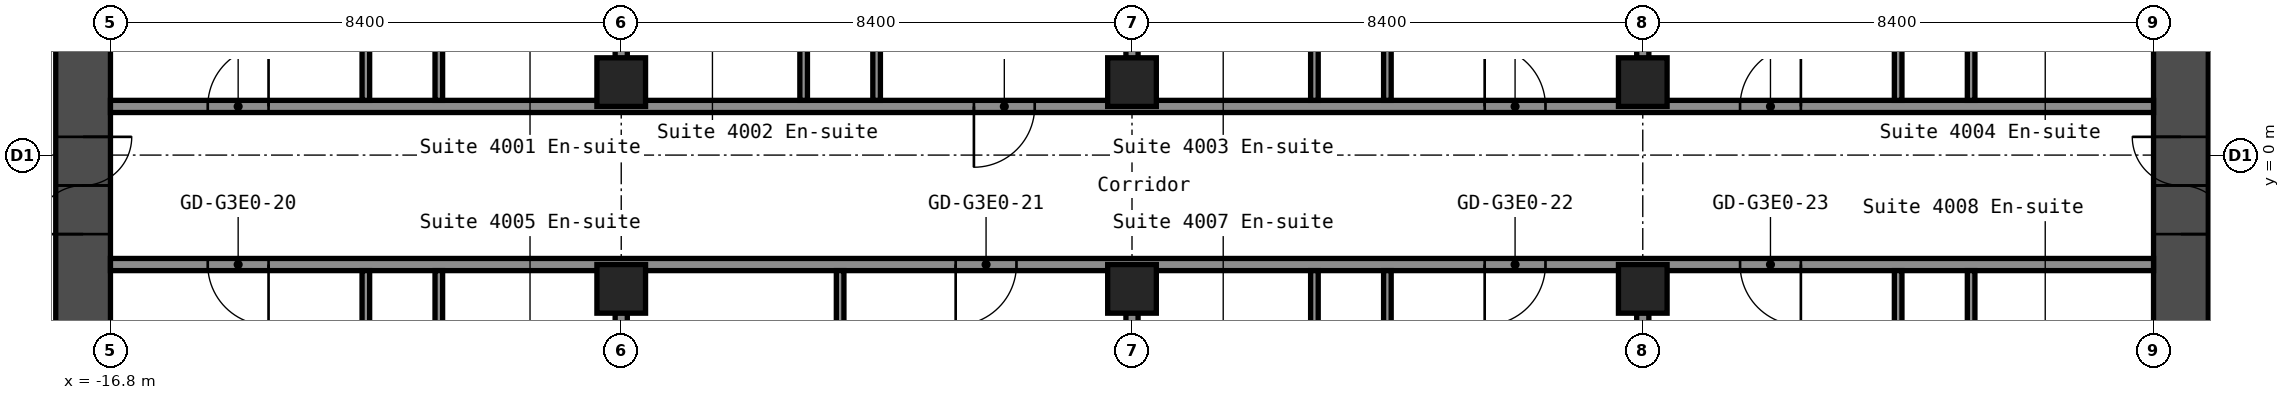
"""IFC4 building model, lengths in metres.
Left out: names, types, materials, properties, quantities, classifications, styles, units other than length and angle.
Written with IfcOpenShell. Run it as: python <this file> out.ifc"""

import sys

from ifc_helpers import new_model, si_unit, direction, frame, frame_2d, origin, origin_2d, place, context, subcontext, project, spatial, rectangle, hollow_rectangle, extrude, element, fill, save


model = new_model("IFC4")
c1 = context("Model", 3, precision=1e-05, world=origin(), true_north=direction((0.0, 1.0)))
c2 = subcontext(c1, "Body", "Model", "MODEL_VIEW")
j1 = project(units=[si_unit("LENGTHUNIT", "METRE"), si_unit("PLANEANGLEUNIT", "RADIAN")], contexts=[c1])
p1 = place(None, origin())
s1 = spatial("IfcSite", under=j1, at=p1, CompositionType="ELEMENT")
p2 = place(p1, origin())
s2 = spatial("IfcBuilding", under=s1, at=p2, CompositionType="ELEMENT")
p3 = place(p2, frame((0.0, 0.0, 143.8)))
s3 = spatial("IfcBuildingStorey", under=s2, at=p3, CompositionType="ELEMENT", Elevation=143.8)
for number, where, z_axis, x_axis in (
    (1, (-8.4, -2.2, 0.0), (0.0, 0.0, 1.0), (1.0, 0.0, 0.0)),
    (2, (-8.4, 1.2, 0.0), (0.0, 0.0, 1.0), (1.0, 0.0, 0.0)),
    (3, (0.0, -2.2, 0.0), (0.0, 0.0, 1.0), (1.0, 0.0, 0.0)),
    (4, (0.0, 1.2, 0.0), (0.0, 0.0, 1.0), (1.0, 0.0, 0.0)),
    (5, (8.4, -2.2, 0.0), (0.0, 0.0, 1.0), (1.0, 0.0, 0.0)),
    (6, (8.4, 1.2, 0.0), (0.0, 0.0, 1.0), (1.0, 0.0, 0.0)),
):
    element("IfcColumn", number, at=place(p3, frame(where, z_axis=z_axis, x_axis=x_axis)), inside=s3, PredefinedType="COLUMN", context=c2, shape_type="SweptSolid", body=[
        extrude(hollow_rectangle(XDim=0.8, YDim=0.8, WallThickness=0.032, at=origin_2d()), origin(), (0.0, 0.0, 1.0), 2.75),
    ])
p4 = place(p3, frame((-17.25, -8.4, 0.0), z_axis=(0.0, 0.0, 1.0), x_axis=(0.0, 1.0, 0.0)))
e7 = element("IfcWall", 7, at=p4, inside=s3, PredefinedType="SHEAR", context=c2, shape_type="SweptSolid", body=[
    extrude(rectangle(XDim=16.8, YDim=0.9, at=frame_2d((8.4, 0.0))), origin(), (0.0, 0.0, 1.0), 2.75),
])
p5 = place(p4, frame((7.1, 0.0, 0.0)))
e8 = element("IfcOpeningElement", 8, at=p5, cuts=e7, PredefinedType="OPENING", context=c2, shape_type="SweptSolid", body=[
    extrude(rectangle(XDim=1.6, YDim=2.1, at=frame_2d((0.8, 1.05))), frame((0.0, 0.46, 0.0), z_axis=(0.0, -1.0, 0.0), x_axis=(1.0, 0.0, 0.0)), (0.0, 0.0, 1.0), 0.92),
])
p6 = place(p3, frame((17.25, -8.4, 0.0), z_axis=(0.0, 0.0, 1.0), x_axis=(0.0, 1.0, 0.0)))
e9 = element("IfcWall", 9, at=p6, inside=s3, PredefinedType="SHEAR", context=c2, shape_type="SweptSolid", body=[
    extrude(rectangle(XDim=16.8, YDim=0.9, at=frame_2d((8.4, 0.0))), origin(), (0.0, 0.0, 1.0), 2.75),
])
p7 = place(p6, frame((7.1, 0.0, 0.0)))
e10 = element("IfcOpeningElement", 10, at=p7, cuts=e9, PredefinedType="OPENING", context=c2, shape_type="SweptSolid", body=[
    extrude(rectangle(XDim=1.6, YDim=2.1, at=frame_2d((0.8, 1.05))), frame((0.0, 0.46, 0.0), z_axis=(0.0, -1.0, 0.0), x_axis=(1.0, 0.0, 0.0)), (0.0, 0.0, 1.0), 0.92),
])
p8 = place(p3, frame((-16.8, -1.8, 0.0), z_axis=(0.0, 0.0, 1.0), x_axis=(1.0, 0.0, 0.0)))
e11 = element("IfcWall", 11, at=p8, inside=s3, PredefinedType="PARTITIONING", context=c2, shape_type="SweptSolid", body=[
    extrude(rectangle(XDim=33.6, YDim=0.2, at=frame_2d((16.8, 0.0))), origin(), (0.0, 0.0, 1.0), 2.75),
])
p9 = place(p8, frame((1.6, 0.0, 0.0)))
e12 = element("IfcOpeningElement", 12, at=p9, cuts=e11, PredefinedType="OPENING", context=c2, shape_type="SweptSolid", body=[
    extrude(rectangle(XDim=1.0, YDim=2.1, at=frame_2d((0.5, 1.05))), frame((0.0, 0.11, 0.0), z_axis=(0.0, -1.0, 0.0), x_axis=(1.0, 0.0, 0.0)), (0.0, 0.0, 1.0), 0.22),
])
p10 = place(p8, frame((13.9, 0.0, 0.0)))
e13 = element("IfcOpeningElement", 13, at=p10, cuts=e11, PredefinedType="OPENING", context=c2, shape_type="SweptSolid", body=[
    extrude(rectangle(XDim=1.0, YDim=2.1, at=frame_2d((0.5, 1.05))), frame((0.0, 0.11, 0.0), z_axis=(0.0, -1.0, 0.0), x_axis=(1.0, 0.0, 0.0)), (0.0, 0.0, 1.0), 0.22),
])
p11 = place(p8, frame((22.6, 0.0, 0.0)))
e14 = element("IfcOpeningElement", 14, at=p11, cuts=e11, PredefinedType="OPENING", context=c2, shape_type="SweptSolid", body=[
    extrude(rectangle(XDim=1.0, YDim=2.1, at=frame_2d((0.5, 1.05))), frame((0.0, 0.11, 0.0), z_axis=(0.0, -1.0, 0.0), x_axis=(1.0, 0.0, 0.0)), (0.0, 0.0, 1.0), 0.22),
])
p12 = place(p8, frame((26.8, 0.0, 0.0)))
e15 = element("IfcOpeningElement", 15, at=p12, cuts=e11, PredefinedType="OPENING", context=c2, shape_type="SweptSolid", body=[
    extrude(rectangle(XDim=1.0, YDim=2.1, at=frame_2d((0.5, 1.05))), frame((0.0, 0.11, 0.0), z_axis=(0.0, -1.0, 0.0), x_axis=(1.0, 0.0, 0.0)), (0.0, 0.0, 1.0), 0.22),
])
p13 = place(p3, frame((-16.8, 0.8, 0.0), z_axis=(0.0, 0.0, 1.0), x_axis=(1.0, 0.0, 0.0)))
e16 = element("IfcWall", 16, at=p13, inside=s3, PredefinedType="PARTITIONING", context=c2, shape_type="SweptSolid", body=[
    extrude(rectangle(XDim=33.6, YDim=0.2, at=frame_2d((16.8, 0.0))), origin(), (0.0, 0.0, 1.0), 2.75),
])
p14 = place(p13, frame((1.6, 0.0, 0.0)))
e17 = element("IfcOpeningElement", 17, at=p14, cuts=e16, PredefinedType="OPENING", context=c2, shape_type="SweptSolid", body=[
    extrude(rectangle(XDim=1.0, YDim=2.1, at=frame_2d((0.5, 1.05))), frame((0.0, 0.11, 0.0), z_axis=(0.0, -1.0, 0.0), x_axis=(1.0, 0.0, 0.0)), (0.0, 0.0, 1.0), 0.22),
])
p15 = place(p13, frame((14.2, 0.0, 0.0)))
e18 = element("IfcOpeningElement", 18, at=p15, cuts=e16, PredefinedType="OPENING", context=c2, shape_type="SweptSolid", body=[
    extrude(rectangle(XDim=1.0, YDim=2.1, at=frame_2d((0.5, 1.05))), frame((0.0, 0.11, 0.0), z_axis=(0.0, -1.0, 0.0), x_axis=(1.0, 0.0, 0.0)), (0.0, 0.0, 1.0), 0.22),
])
p16 = place(p13, frame((22.6, 0.0, 0.0)))
e19 = element("IfcOpeningElement", 19, at=p16, cuts=e16, PredefinedType="OPENING", context=c2, shape_type="SweptSolid", body=[
    extrude(rectangle(XDim=1.0, YDim=2.1, at=frame_2d((0.5, 1.05))), frame((0.0, 0.11, 0.0), z_axis=(0.0, -1.0, 0.0), x_axis=(1.0, 0.0, 0.0)), (0.0, 0.0, 1.0), 0.22),
])
p17 = place(p13, frame((26.8, 0.0, 0.0)))
e20 = element("IfcOpeningElement", 20, at=p17, cuts=e16, PredefinedType="OPENING", context=c2, shape_type="SweptSolid", body=[
    extrude(rectangle(XDim=1.0, YDim=2.1, at=frame_2d((0.5, 1.05))), frame((0.0, 0.11, 0.0), z_axis=(0.0, -1.0, 0.0), x_axis=(1.0, 0.0, 0.0)), (0.0, 0.0, 1.0), 0.22),
])
p18 = place(p3, frame((-12.6, -19.3, 0.0), z_axis=(0.0, 0.0, 1.0), x_axis=(0.0, 1.0, 0.0)))
e21 = element("IfcWall", 21, at=p18, inside=s3, PredefinedType="PARTITIONING", context=c2, shape_type="SweptSolid", body=[
    extrude(rectangle(XDim=17.4, YDim=0.125, at=frame_2d((8.7, 0.0))), origin(), (0.0, 0.0, 1.0), 2.75),
])
p19 = place(p18, frame((12.45, 0.0, 0.0)))
e22 = element("IfcOpeningElement", 22, at=p19, cuts=e21, PredefinedType="OPENING", context=c2, shape_type="SweptSolid", body=[
    extrude(rectangle(XDim=0.9, YDim=2.1, at=frame_2d((0.45, 1.05))), frame((0.0, 0.073, 0.0), z_axis=(0.0, -1.0, 0.0), x_axis=(1.0, 0.0, 0.0)), (0.0, 0.0, 1.0), 0.145),
])
p20 = place(p3, frame((-12.6, 0.9, 0.0), z_axis=(0.0, 0.0, 1.0), x_axis=(0.0, 1.0, 0.0)))
e23 = element("IfcWall", 23, at=p20, inside=s3, PredefinedType="PARTITIONING", context=c2, shape_type="SweptSolid", body=[
    extrude(rectangle(XDim=17.4, YDim=0.125, at=frame_2d((8.7, 0.0))), origin(), (0.0, 0.0, 1.0), 2.75),
])
p21 = place(p20, frame((4.05, 0.0, 0.0)))
e24 = element("IfcOpeningElement", 24, at=p21, cuts=e23, PredefinedType="OPENING", context=c2, shape_type="SweptSolid", body=[
    extrude(rectangle(XDim=0.9, YDim=2.1, at=frame_2d((0.45, 1.05))), frame((0.0, 0.073, 0.0), z_axis=(0.0, -1.0, 0.0), x_axis=(1.0, 0.0, 0.0)), (0.0, 0.0, 1.0), 0.145),
])
for number, where, z_axis, x_axis in (
    (25, (-11.4, -5.0, 0.0), (0.0, 0.0, 1.0), (0.0, 1.0, 0.0)),
    (26, (-11.4, 0.9, 0.0), (0.0, 0.0, 1.0), (0.0, 1.0, 0.0)),
):
    element("IfcWall", number, at=place(p3, frame(where, z_axis=z_axis, x_axis=x_axis)), inside=s3, PredefinedType="PARTITIONING", context=c2, shape_type="SweptSolid", body=[
        extrude(rectangle(XDim=3.1, YDim=0.125, at=frame_2d((1.55, 0.0))), origin(), (0.0, 0.0, 1.0), 2.75),
    ])
for number, where, z_axis, x_axis in (
    (27, (-8.4, -19.3, 0.0), (0.0, 0.0, 1.0), (0.0, 1.0, 0.0)),
    (28, (-8.4, 1.59, 0.0), (0.0, 0.0, 1.0), (0.0, 1.0, 0.0)),
):
    element("IfcWall", number, at=place(p3, frame(where, z_axis=z_axis, x_axis=x_axis)), inside=s3, PredefinedType="PARTITIONING", context=c2, shape_type="SweptSolid", body=[
        extrude(rectangle(XDim=16.71, YDim=0.2, at=frame_2d((8.355, 0.0))), origin(), (0.0, 0.0, 1.0), 2.75),
    ])
p22 = place(p3, frame((-5.4, 0.9, 0.0), z_axis=(0.0, 0.0, 1.0), x_axis=(0.0, 1.0, 0.0)))
e29 = element("IfcWall", 29, at=p22, inside=s3, PredefinedType="PARTITIONING", context=c2, shape_type="SweptSolid", body=[
    extrude(rectangle(XDim=3.1, YDim=0.125, at=frame_2d((1.55, 0.0))), origin(), (0.0, 0.0, 1.0), 2.75),
])
p23 = place(p3, frame((-4.8, -5.2, 0.0), z_axis=(0.0, 0.0, 1.0), x_axis=(0.0, 1.0, 0.0)))
e30 = element("IfcWall", 30, at=p23, inside=s3, PredefinedType="PARTITIONING", context=c2, shape_type="SweptSolid", body=[
    extrude(rectangle(XDim=3.3, YDim=0.125, at=frame_2d((1.65, 0.0))), origin(), (0.0, 0.0, 1.0), 2.75),
])
p24 = place(p23, frame((1.2, 0.0, 0.0)))
e31 = element("IfcOpeningElement", 31, at=p24, cuts=e30, PredefinedType="OPENING", context=c2, shape_type="SweptSolid", body=[
    extrude(rectangle(XDim=1.0, YDim=2.1, at=frame_2d((0.5, 1.05))), frame((0.0, 0.073, 0.0), z_axis=(0.0, -1.0, 0.0), x_axis=(1.0, 0.0, 0.0)), (0.0, 0.0, 1.0), 0.145),
])
p25 = place(p3, frame((-4.2, 0.9, 0.0), z_axis=(0.0, 0.0, 1.0), x_axis=(0.0, 1.0, 0.0)))
e32 = element("IfcWall", 32, at=p25, inside=s3, PredefinedType="PARTITIONING", context=c2, shape_type="SweptSolid", body=[
    extrude(rectangle(XDim=17.4, YDim=0.125, at=frame_2d((8.7, 0.0))), origin(), (0.0, 0.0, 1.0), 2.75),
])
p26 = place(p25, frame((4.05, 0.0, 0.0)))
e33 = element("IfcOpeningElement", 33, at=p26, cuts=e32, PredefinedType="OPENING", context=c2, shape_type="SweptSolid", body=[
    extrude(rectangle(XDim=0.9, YDim=2.1, at=frame_2d((0.45, 1.05))), frame((0.0, 0.073, 0.0), z_axis=(0.0, -1.0, 0.0), x_axis=(1.0, 0.0, 0.0)), (0.0, 0.0, 1.0), 0.145),
])
for number, where, z_axis, x_axis in (
    (34, (0.0, -19.3, 0.0), (0.0, 0.0, 1.0), (0.0, 1.0, 0.0)),
    (35, (0.0, 1.59, 0.0), (0.0, 0.0, 1.0), (0.0, 1.0, 0.0)),
):
    element("IfcWall", number, at=place(p3, frame(where, z_axis=z_axis, x_axis=x_axis)), inside=s3, PredefinedType="PARTITIONING", context=c2, shape_type="SweptSolid", body=[
        extrude(rectangle(XDim=16.71, YDim=0.2, at=frame_2d((8.355, 0.0))), origin(), (0.0, 0.0, 1.0), 2.75),
    ])
for number, where, z_axis, x_axis in (
    (36, (3.0, -5.0, 0.0), (0.0, 0.0, 1.0), (0.0, 1.0, 0.0)),
    (37, (3.0, 0.9, 0.0), (0.0, 0.0, 1.0), (0.0, 1.0, 0.0)),
):
    element("IfcWall", number, at=place(p3, frame(where, z_axis=z_axis, x_axis=x_axis)), inside=s3, PredefinedType="PARTITIONING", context=c2, shape_type="SweptSolid", body=[
        extrude(rectangle(XDim=3.1, YDim=0.125, at=frame_2d((1.55, 0.0))), origin(), (0.0, 0.0, 1.0), 2.75),
    ])
p27 = place(p3, frame((4.2, -19.3, 0.0), z_axis=(0.0, 0.0, 1.0), x_axis=(0.0, 1.0, 0.0)))
e38 = element("IfcWall", 38, at=p27, inside=s3, PredefinedType="PARTITIONING", context=c2, shape_type="SweptSolid", body=[
    extrude(rectangle(XDim=17.4, YDim=0.125, at=frame_2d((8.7, 0.0))), origin(), (0.0, 0.0, 1.0), 2.75),
])
p28 = place(p27, frame((12.45, 0.0, 0.0)))
e39 = element("IfcOpeningElement", 39, at=p28, cuts=e38, PredefinedType="OPENING", context=c2, shape_type="SweptSolid", body=[
    extrude(rectangle(XDim=0.9, YDim=2.1, at=frame_2d((0.45, 1.05))), frame((0.0, 0.073, 0.0), z_axis=(0.0, -1.0, 0.0), x_axis=(1.0, 0.0, 0.0)), (0.0, 0.0, 1.0), 0.145),
])
p29 = place(p3, frame((4.2, 0.9, 0.0), z_axis=(0.0, 0.0, 1.0), x_axis=(0.0, 1.0, 0.0)))
e40 = element("IfcWall", 40, at=p29, inside=s3, PredefinedType="PARTITIONING", context=c2, shape_type="SweptSolid", body=[
    extrude(rectangle(XDim=17.4, YDim=0.125, at=frame_2d((8.7, 0.0))), origin(), (0.0, 0.0, 1.0), 2.75),
])
p30 = place(p29, frame((4.05, 0.0, 0.0)))
e41 = element("IfcOpeningElement", 41, at=p30, cuts=e40, PredefinedType="OPENING", context=c2, shape_type="SweptSolid", body=[
    extrude(rectangle(XDim=0.9, YDim=2.1, at=frame_2d((0.45, 1.05))), frame((0.0, 0.073, 0.0), z_axis=(0.0, -1.0, 0.0), x_axis=(1.0, 0.0, 0.0)), (0.0, 0.0, 1.0), 0.145),
])
for number, where, z_axis, x_axis in (
    (42, (8.4, -19.3, 0.0), (0.0, 0.0, 1.0), (0.0, 1.0, 0.0)),
    (43, (8.4, 1.59, 0.0), (0.0, 0.0, 1.0), (0.0, 1.0, 0.0)),
):
    element("IfcWall", number, at=place(p3, frame(where, z_axis=z_axis, x_axis=x_axis)), inside=s3, PredefinedType="PARTITIONING", context=c2, shape_type="SweptSolid", body=[
        extrude(rectangle(XDim=16.71, YDim=0.2, at=frame_2d((8.355, 0.0))), origin(), (0.0, 0.0, 1.0), 2.75),
    ])
p31 = place(p3, frame((12.6, -19.3, 0.0), z_axis=(0.0, 0.0, 1.0), x_axis=(0.0, 1.0, 0.0)))
e44 = element("IfcWall", 44, at=p31, inside=s3, PredefinedType="PARTITIONING", context=c2, shape_type="SweptSolid", body=[
    extrude(rectangle(XDim=17.4, YDim=0.125, at=frame_2d((8.7, 0.0))), origin(), (0.0, 0.0, 1.0), 2.75),
])
p32 = place(p31, frame((12.45, 0.0, 0.0)))
e45 = element("IfcOpeningElement", 45, at=p32, cuts=e44, PredefinedType="OPENING", context=c2, shape_type="SweptSolid", body=[
    extrude(rectangle(XDim=0.9, YDim=2.1, at=frame_2d((0.45, 1.05))), frame((0.0, 0.073, 0.0), z_axis=(0.0, -1.0, 0.0), x_axis=(1.0, 0.0, 0.0)), (0.0, 0.0, 1.0), 0.145),
])
p33 = place(p3, frame((12.6, 0.9, 0.0), z_axis=(0.0, 0.0, 1.0), x_axis=(0.0, 1.0, 0.0)))
e46 = element("IfcWall", 46, at=p33, inside=s3, PredefinedType="PARTITIONING", context=c2, shape_type="SweptSolid", body=[
    extrude(rectangle(XDim=17.4, YDim=0.125, at=frame_2d((8.7, 0.0))), origin(), (0.0, 0.0, 1.0), 2.75),
])
p34 = place(p33, frame((4.05, 0.0, 0.0)))
e47 = element("IfcOpeningElement", 47, at=p34, cuts=e46, PredefinedType="OPENING", context=c2, shape_type="SweptSolid", body=[
    extrude(rectangle(XDim=0.9, YDim=2.1, at=frame_2d((0.45, 1.05))), frame((0.0, 0.073, 0.0), z_axis=(0.0, -1.0, 0.0), x_axis=(1.0, 0.0, 0.0)), (0.0, 0.0, 1.0), 0.145),
])
for number, where, z_axis, x_axis in (
    (48, (13.8, -5.0, 0.0), (0.0, 0.0, 1.0), (0.0, 1.0, 0.0)),
    (49, (13.8, 0.9, 0.0), (0.0, 0.0, 1.0), (0.0, 1.0, 0.0)),
):
    element("IfcWall", number, at=place(p3, frame(where, z_axis=z_axis, x_axis=x_axis)), inside=s3, PredefinedType="PARTITIONING", context=c2, shape_type="SweptSolid", body=[
        extrude(rectangle(XDim=3.1, YDim=0.125, at=frame_2d((1.55, 0.0))), origin(), (0.0, 0.0, 1.0), 2.75),
    ])
p35 = place(p5, origin())
e50 = element("IfcDoor", 50, at=p35, inside=s3, OperationType="DOUBLE_DOOR_SINGLE_SWING", PredefinedType="DOOR", context=c2, shape_type="SweptSolid", body=[
    extrude(rectangle(XDim=1.6, YDim=2.1, at=frame_2d((0.8, 1.05))), frame((0.0, 0.025, 0.0), z_axis=(0.0, -1.0, 0.0), x_axis=(1.0, 0.0, 0.0)), (0.0, 0.0, 1.0), 0.05),
])
fill(e8, e50)
p36 = place(p7, origin())
e51 = element("IfcDoor", 51, at=p36, inside=s3, OperationType="DOUBLE_DOOR_SINGLE_SWING", PredefinedType="DOOR", context=c2, shape_type="SweptSolid", body=[
    extrude(rectangle(XDim=1.6, YDim=2.1, at=frame_2d((0.8, 1.05))), frame((0.0, 0.025, 0.0), z_axis=(0.0, -1.0, 0.0), x_axis=(1.0, 0.0, 0.0)), (0.0, 0.0, 1.0), 0.05),
])
fill(e10, e51)
p37 = place(p9, origin())
e52 = element("IfcDoor", 52, at=p37, inside=s3, OperationType="SINGLE_SWING_RIGHT", PredefinedType="DOOR", context=c2, shape_type="SweptSolid", body=[
    extrude(rectangle(XDim=1.0, YDim=2.1, at=frame_2d((0.5, 1.05))), frame((0.0, 0.025, 0.0), z_axis=(0.0, -1.0, 0.0), x_axis=(1.0, 0.0, 0.0)), (0.0, 0.0, 1.0), 0.05),
])
fill(e12, e52)
p38 = place(p10, origin())
e53 = element("IfcDoor", 53, at=p38, inside=s3, OperationType="SINGLE_SWING_LEFT", PredefinedType="DOOR", context=c2, shape_type="SweptSolid", body=[
    extrude(rectangle(XDim=1.0, YDim=2.1, at=frame_2d((0.5, 1.05))), frame((0.0, 0.025, 0.0), z_axis=(0.0, -1.0, 0.0), x_axis=(1.0, 0.0, 0.0)), (0.0, 0.0, 1.0), 0.05),
])
fill(e13, e53)
p39 = place(p11, origin())
e54 = element("IfcDoor", 54, at=p39, inside=s3, OperationType="SINGLE_SWING_LEFT", PredefinedType="DOOR", context=c2, shape_type="SweptSolid", body=[
    extrude(rectangle(XDim=1.0, YDim=2.1, at=frame_2d((0.5, 1.05))), frame((0.0, 0.025, 0.0), z_axis=(0.0, -1.0, 0.0), x_axis=(1.0, 0.0, 0.0)), (0.0, 0.0, 1.0), 0.05),
])
fill(e14, e54)
p40 = place(p12, origin())
e55 = element("IfcDoor", 55, at=p40, inside=s3, OperationType="SINGLE_SWING_RIGHT", PredefinedType="DOOR", context=c2, shape_type="SweptSolid", body=[
    extrude(rectangle(XDim=1.0, YDim=2.1, at=frame_2d((0.5, 1.05))), frame((0.0, 0.025, 0.0), z_axis=(0.0, -1.0, 0.0), x_axis=(1.0, 0.0, 0.0)), (0.0, 0.0, 1.0), 0.05),
])
fill(e15, e55)
p41 = place(p14, origin())
e56 = element("IfcDoor", 56, at=p41, inside=s3, OperationType="SINGLE_SWING_LEFT", PredefinedType="DOOR", context=c2, shape_type="SweptSolid", body=[
    extrude(rectangle(XDim=1.0, YDim=2.1, at=frame_2d((0.5, 1.05))), frame((0.0, 0.025, 0.0), z_axis=(0.0, -1.0, 0.0), x_axis=(1.0, 0.0, 0.0)), (0.0, 0.0, 1.0), 0.05),
])
fill(e17, e56)
p42 = place(p15, origin())
e57 = element("IfcDoor", 57, at=p42, inside=s3, OperationType="SINGLE_SWING_LEFT", PredefinedType="DOOR", context=c2, shape_type="SweptSolid", body=[
    extrude(rectangle(XDim=1.0, YDim=2.1, at=frame_2d((0.5, 1.05))), frame((0.0, 0.025, 0.0), z_axis=(0.0, -1.0, 0.0), x_axis=(1.0, 0.0, 0.0)), (0.0, 0.0, 1.0), 0.05),
])
fill(e18, e57)
p43 = place(p16, origin())
e58 = element("IfcDoor", 58, at=p43, inside=s3, OperationType="SINGLE_SWING_RIGHT", PredefinedType="DOOR", context=c2, shape_type="SweptSolid", body=[
    extrude(rectangle(XDim=1.0, YDim=2.1, at=frame_2d((0.5, 1.05))), frame((0.0, 0.025, 0.0), z_axis=(0.0, -1.0, 0.0), x_axis=(1.0, 0.0, 0.0)), (0.0, 0.0, 1.0), 0.05),
])
fill(e19, e58)
p44 = place(p17, origin())
e59 = element("IfcDoor", 59, at=p44, inside=s3, OperationType="SINGLE_SWING_LEFT", PredefinedType="DOOR", context=c2, shape_type="SweptSolid", body=[
    extrude(rectangle(XDim=1.0, YDim=2.1, at=frame_2d((0.5, 1.05))), frame((0.0, 0.025, 0.0), z_axis=(0.0, -1.0, 0.0), x_axis=(1.0, 0.0, 0.0)), (0.0, 0.0, 1.0), 0.05),
])
fill(e20, e59)
save(model, sys.argv[1])
